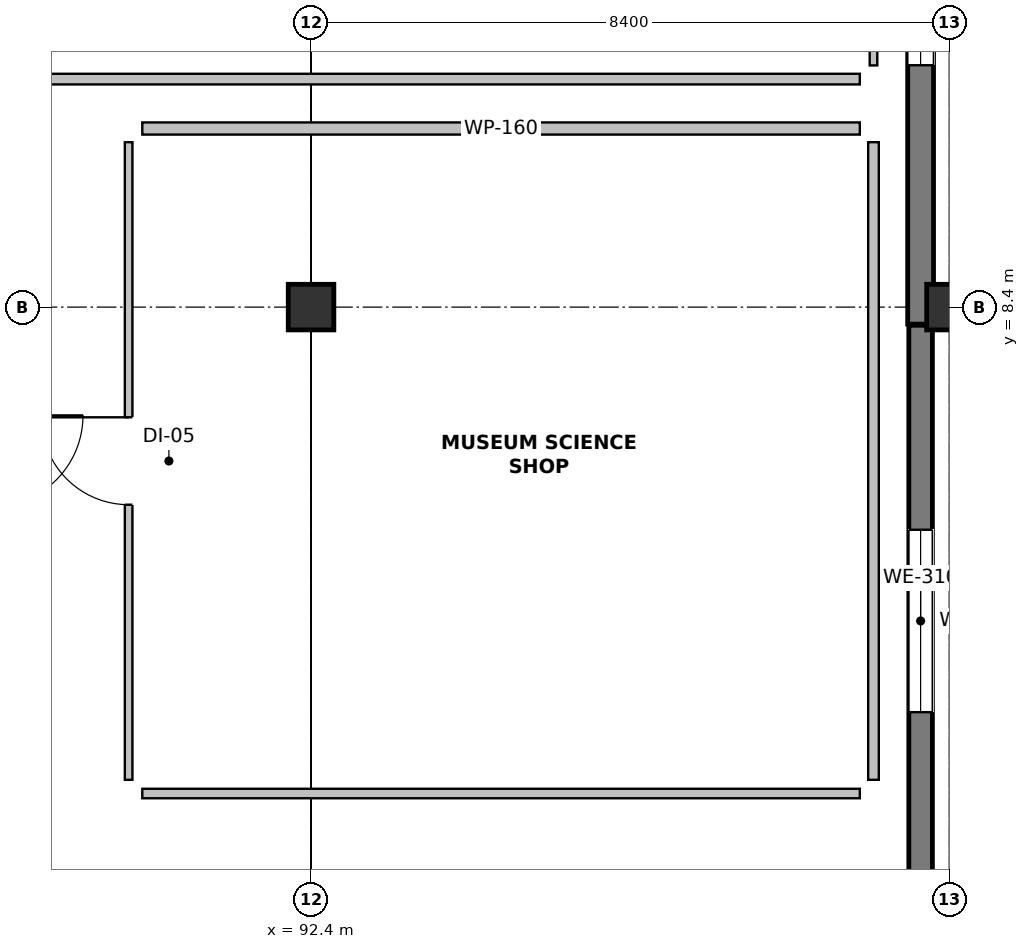
"""IFC4 building model, lengths in metres.
Left out: names, types, materials, properties, quantities, classifications, styles, units other than length and angle.
Written with IfcOpenShell. Run it as: python <this file> out.ifc"""

import sys

from ifc_helpers import new_model, si_unit, direction, frame, frame_2d, origin, origin_2d, place, context, subcontext, project, spatial, rectangle, extrude, element, fill, save


model = new_model("IFC4")
c1 = context("Model", 3, precision=1e-05, world=origin(), true_north=direction((0.0, 1.0)))
c2 = subcontext(c1, "Body", "Model", "MODEL_VIEW")
j1 = project(units=[si_unit("LENGTHUNIT", "METRE"), si_unit("PLANEANGLEUNIT", "RADIAN")], contexts=[c1])
p1 = place(None, origin())
s1 = spatial("IfcSite", under=j1, at=p1, CompositionType="ELEMENT")
p2 = place(p1, origin())
s2 = spatial("IfcBuilding", under=s1, at=p2, CompositionType="ELEMENT")
p3 = place(p2, origin())
s3 = spatial("IfcBuildingStorey", under=s2, at=p3, CompositionType="ELEMENT", Elevation=0.0)
for number, where, z_axis, x_axis in (
    (1, (92.4, 8.4, 0.0), (0.0, 0.0, 1.0), (1.0, 0.0, 0.0)),
    (2, (100.8, 8.4, 0.0), (0.0, 0.0, 1.0), (1.0, 0.0, 0.0)),
):
    element("IfcColumn", number, at=place(p3, frame(where, z_axis=z_axis, x_axis=x_axis)), inside=s3, PredefinedType="COLUMN", context=c2, shape_type="SweptSolid", body=[
        extrude(rectangle(XDim=0.6, YDim=0.6, at=origin_2d()), origin(), (0.0, 0.0, 1.0), 5.1),
    ])
p4 = place(p3, frame((100.42, 16.561, 0.0), z_axis=(0.0, 0.0, 1.0), x_axis=(0.0, -1.0, 0.0)))
e3 = element("IfcWall", 3, at=p4, inside=s3, PredefinedType="SOLIDWALL", context=c2, shape_type="SweptSolid", body=[
    extrude(rectangle(XDim=8.385, YDim=0.34, at=frame_2d((4.192, 0.0))), origin(), (0.0, 0.0, 1.0), 3.9),
])
p5 = place(p4, frame((2.878, 0.0, 0.85)))
e4 = element("IfcOpeningElement", 4, at=p5, cuts=e3, PredefinedType="OPENING", context=c2, shape_type="SweptSolid", body=[
    extrude(rectangle(XDim=2.1, YDim=1.55, at=frame_2d((1.05, 0.775))), frame((0.0, 0.182, 0.0), z_axis=(0.0, -1.0, 0.0), x_axis=(1.0, 0.0, 0.0)), (0.0, 0.0, 1.0), 0.364),
])
p6 = place(p3, frame((100.42, 8.161, 0.0), z_axis=(0.0, 0.0, 1.0), x_axis=(0.0, -1.0, 0.0)))
e5 = element("IfcWall", 5, at=p6, inside=s3, PredefinedType="SOLIDWALL", context=c2, shape_type="SweptSolid", body=[
    extrude(rectangle(XDim=7.781, YDim=0.31, at=frame_2d((3.891, 0.0))), origin(), (0.0, 0.0, 1.0), 3.9),
])
p7 = place(p6, frame((2.69, 0.0, 0.85)))
e6 = element("IfcOpeningElement", 6, at=p7, cuts=e5, PredefinedType="OPENING", context=c2, shape_type="SweptSolid", body=[
    extrude(rectangle(XDim=2.4, YDim=1.55, at=frame_2d((1.2, 0.775))), frame((0.0, 0.167, 0.0), z_axis=(0.0, -1.0, 0.0), x_axis=(1.0, 0.0, 0.0)), (0.0, 0.0, 1.0), 0.334),
])
p8 = place(p3, frame((99.62, 11.4, 0.0), z_axis=(0.0, 0.0, 1.0), x_axis=(-1.0, 0.0, 0.0)))
e7 = element("IfcWall", 7, at=p8, inside=s3, PredefinedType="PARTITIONING", context=c2, shape_type="SweptSolid", body=[
    extrude(rectangle(XDim=32.64, YDim=0.14, at=frame_2d((16.32, 0.0))), origin(), (0.0, 0.0, 1.0), 4.25),
])
p9 = place(p8, frame((25.965, 0.0, 0.0)))
e8 = element("IfcOpeningElement", 8, at=p9, cuts=e7, PredefinedType="OPENING", context=c2, shape_type="SweptSolid", body=[
    extrude(rectangle(XDim=1.6, YDim=2.2, at=frame_2d((0.8, 1.1))), frame((0.0, 0.082, 0.0), z_axis=(0.0, -1.0, 0.0), x_axis=(1.0, 0.0, 0.0)), (0.0, 0.0, 1.0), 0.164),
])
p10 = place(p3, frame((99.8, 41.62, 0.0), z_axis=(0.0, 0.0, 1.0), x_axis=(0.0, -1.0, 0.0)))
e9 = element("IfcWall", 9, at=p10, inside=s3, PredefinedType="PARTITIONING", context=c2, shape_type="SweptSolid", body=[
    extrude(rectangle(XDim=30.04, YDim=0.1, at=frame_2d((15.02, 0.0))), origin(), (0.0, 0.0, 1.0), 4.7),
])
p11 = place(p3, frame((90.18, 10.75, 0.0), z_axis=(0.0, 0.0, 1.0), x_axis=(1.0, 0.0, 0.0)))
e10 = element("IfcWall", 10, at=p11, inside=s3, PredefinedType="PARTITIONING", context=c2, shape_type="SweptSolid", body=[
    extrude(rectangle(XDim=9.44, YDim=0.16, at=frame_2d((4.72, 0.0))), origin(), (0.0, 0.0, 1.0), 4.25),
])
p12 = place(p3, frame((99.8, 10.57, 0.0), z_axis=(0.0, 0.0, 1.0), x_axis=(0.0, -1.0, 0.0)))
e11 = element("IfcWall", 11, at=p12, inside=s3, PredefinedType="PARTITIONING", context=c2, shape_type="SweptSolid", body=[
    extrude(rectangle(XDim=8.39, YDim=0.14, at=frame_2d((4.195, 0.0))), origin(), (0.0, 0.0, 1.0), 4.7),
])
p13 = place(p3, frame((99.62, 2.0, 0.0), z_axis=(0.0, 0.0, 1.0), x_axis=(-1.0, 0.0, 0.0)))
e12 = element("IfcWall", 12, at=p13, inside=s3, PredefinedType="PARTITIONING", context=c2, shape_type="SweptSolid", body=[
    extrude(rectangle(XDim=9.44, YDim=0.125, at=frame_2d((4.72, 0.0))), origin(), (0.0, 0.0, 1.0), 4.7),
])
p14 = place(p3, frame((90.0, 2.18, 0.0), z_axis=(0.0, 0.0, 1.0), x_axis=(0.0, 1.0, 0.0)))
e13 = element("IfcWall", 13, at=p14, inside=s3, PredefinedType="PARTITIONING", context=c2, shape_type="SweptSolid", body=[
    extrude(rectangle(XDim=8.39, YDim=0.1, at=frame_2d((4.195, 0.0))), origin(), (0.0, 0.0, 1.0), 4.7),
])
p15 = place(p14, frame((3.62, 0.0, 0.0)))
e14 = element("IfcOpeningElement", 14, at=p15, cuts=e13, PredefinedType="OPENING", context=c2, shape_type="SweptSolid", body=[
    extrude(rectangle(XDim=1.15, YDim=2.15, at=frame_2d((0.575, 1.075))), frame((0.0, 0.062, 0.0), z_axis=(0.0, -1.0, 0.0), x_axis=(1.0, 0.0, 0.0)), (0.0, 0.0, 1.0), 0.124),
])
p16 = place(p5, origin())
e15 = element("IfcWindow", 15, at=p16, inside=s3, PartitioningType="SINGLE_PANEL", PredefinedType="WINDOW", context=c2, shape_type="SweptSolid", body=[
    extrude(rectangle(XDim=2.1, YDim=1.55, at=frame_2d((1.05, 0.775))), frame((0.0, 0.03, 0.0), z_axis=(0.0, -1.0, 0.0), x_axis=(1.0, 0.0, 0.0)), (0.0, 0.0, 1.0), 0.06),
])
fill(e4, e15)
p17 = place(p7, origin())
e16 = element("IfcWindow", 16, at=p17, inside=s3, PartitioningType="SINGLE_PANEL", PredefinedType="WINDOW", context=c2, shape_type="SweptSolid", body=[
    extrude(rectangle(XDim=2.4, YDim=1.55, at=frame_2d((1.2, 0.775))), frame((0.0, 0.03, 0.0), z_axis=(0.0, -1.0, 0.0), x_axis=(1.0, 0.0, 0.0)), (0.0, 0.0, 1.0), 0.06),
])
fill(e6, e16)
p18 = place(p15, origin())
e17 = element("IfcDoor", 17, at=p18, inside=s3, OperationType="SINGLE_SWING_RIGHT", PredefinedType="DOOR", context=c2, shape_type="SweptSolid", body=[
    extrude(rectangle(XDim=1.15, YDim=2.15, at=frame_2d((0.575, 1.075))), frame((0.0, 0.025, 0.0), z_axis=(0.0, -1.0, 0.0), x_axis=(1.0, 0.0, 0.0)), (0.0, 0.0, 1.0), 0.05),
])
fill(e14, e17)
save(model, sys.argv[1])
